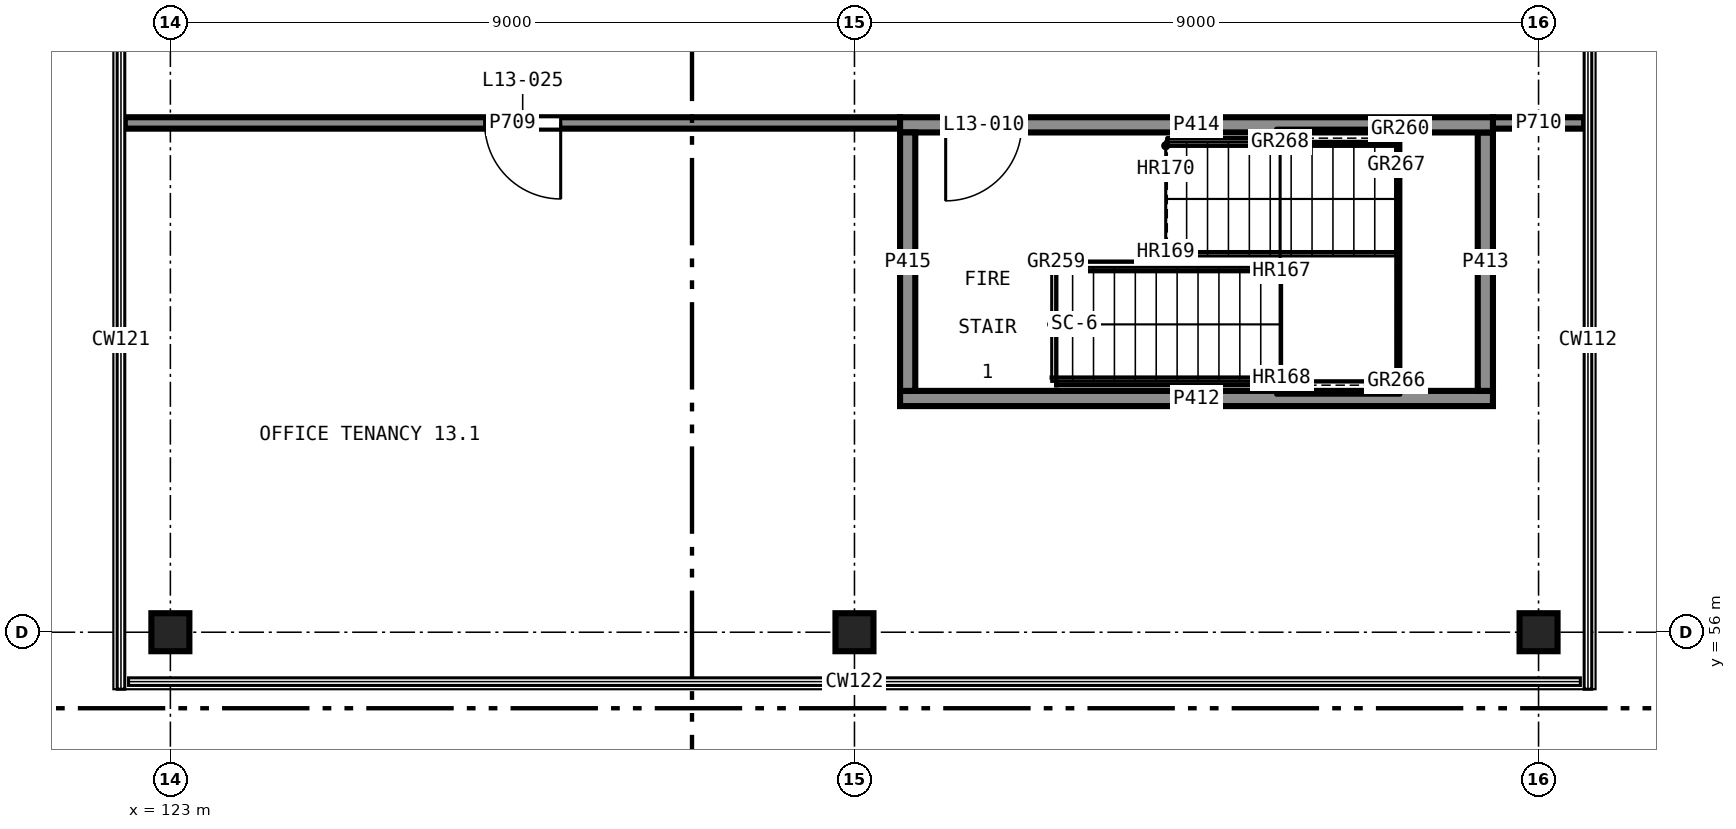
"""IFC4 building model, lengths in metres.
Left out: names, types, materials, properties, quantities, classifications, styles, units other than length and angle.
Written with IfcOpenShell. Run it as: python <this file> out.ifc"""

import sys

from ifc_helpers import new_model, si_unit, direction, frame, frame_2d, origin, origin_2d, place, context, subcontext, project, spatial, rectangle, extrude, element, fill, save


model = new_model("IFC4")
c1 = context("Model", 3, precision=1e-05, world=origin(), true_north=direction((0.0, 1.0)))
c2 = subcontext(c1, "Body", "Model", "MODEL_VIEW")
j1 = project(units=[si_unit("LENGTHUNIT", "METRE"), si_unit("PLANEANGLEUNIT", "RADIAN")], contexts=[c1])
p1 = place(None, origin())
s1 = spatial("IfcSite", under=j1, at=p1, CompositionType="ELEMENT")
p2 = place(p1, origin())
s2 = spatial("IfcBuilding", under=s1, at=p2, CompositionType="ELEMENT")
p3 = place(p2, frame((0.0, 0.0, 53.5)))
s3 = spatial("IfcBuildingStorey", under=s2, at=p3, CompositionType="ELEMENT", Elevation=53.5)
for number, where, z_axis, x_axis in (
    (1, (123.0, 56.0, 0.0), (0.0, 0.0, 1.0), (1.0, 0.0, 0.0)),
    (2, (132.0, 56.0, 0.0), (0.0, 0.0, 1.0), (1.0, 0.0, 0.0)),
    (3, (141.0, 56.0, 0.0), (0.0, 0.0, 1.0), (1.0, 0.0, 0.0)),
):
    element("IfcColumn", number, at=place(p3, frame(where, z_axis=z_axis, x_axis=x_axis)), inside=s3, PredefinedType="COLUMN", context=c2, shape_type="SweptSolid", body=[
        extrude(rectangle(XDim=0.5, YDim=0.5, at=origin_2d()), origin(), (0.0, 0.0, 1.0), 4.0),
    ])
p4 = place(p3, frame((132.6, 59.075, 0.0), z_axis=(0.0, 0.0, 1.0), x_axis=(1.0, 0.0, 0.0)))
e4 = element("IfcWall", 4, at=p4, inside=s3, PredefinedType="SHEAR", context=c2, shape_type="SweptSolid", body=[
    extrude(rectangle(XDim=7.8, YDim=0.2, at=frame_2d((3.9, 0.0))), origin(), (0.0, 0.0, 1.0), 3.75),
])
p5 = place(p3, frame((140.3, 59.175, 0.0), z_axis=(0.0, 0.0, 1.0), x_axis=(0.0, 1.0, 0.0)))
e5 = element("IfcWall", 5, at=p5, inside=s3, PredefinedType="SHEAR", context=c2, shape_type="SweptSolid", body=[
    extrude(rectangle(XDim=3.4, YDim=0.2, at=frame_2d((1.7, 0.0))), origin(), (0.0, 0.0, 1.0), 3.75),
])
p6 = place(p3, frame((140.4, 62.675, 0.0), z_axis=(0.0, 0.0, 1.0), x_axis=(-1.0, 0.0, 0.0)))
e6 = element("IfcWall", 6, at=p6, inside=s3, PredefinedType="SHEAR", context=c2, shape_type="SweptSolid", body=[
    extrude(rectangle(XDim=7.8, YDim=0.2, at=frame_2d((3.9, 0.0))), origin(), (0.0, 0.0, 1.0), 3.75),
])
p7 = place(p6, frame((6.2, 0.0, 0.0)))
e7 = element("IfcOpeningElement", 7, at=p7, cuts=e6, PredefinedType="OPENING", context=c2, shape_type="SweptSolid", body=[
    extrude(rectangle(XDim=1.0, YDim=2.1, at=frame_2d((0.5, 1.05))), frame((0.0, 0.11, 0.0), z_axis=(0.0, -1.0, 0.0), x_axis=(1.0, 0.0, 0.0)), (0.0, 0.0, 1.0), 0.22),
])
p8 = place(p3, frame((132.7, 62.575, 0.0), z_axis=(0.0, 0.0, 1.0), x_axis=(0.0, -1.0, 0.0)))
e8 = element("IfcWall", 8, at=p8, inside=s3, PredefinedType="SHEAR", context=c2, shape_type="SweptSolid", body=[
    extrude(rectangle(XDim=3.4, YDim=0.2, at=frame_2d((1.7, 0.0))), origin(), (0.0, 0.0, 1.0), 3.75),
])
p9 = place(p3, frame((132.6, 62.7, 0.0), z_axis=(0.0, 0.0, 1.0), x_axis=(-1.0, 0.0, 0.0)))
e9 = element("IfcWall", 9, at=p9, inside=s3, PredefinedType="PARTITIONING", context=c2, shape_type="SweptSolid", body=[
    extrude(rectangle(XDim=10.2, YDim=0.15, at=frame_2d((5.1, 0.0))), origin(), (0.0, 0.0, 1.0), 3.75),
])
p10 = place(p9, frame((4.465, 0.0, 0.0)))
e10 = element("IfcOpeningElement", 10, at=p10, cuts=e9, PredefinedType="OPENING", context=c2, shape_type="SweptSolid", body=[
    extrude(rectangle(XDim=1.0, YDim=2.1, at=frame_2d((0.5, 1.05))), frame((0.0, 0.085, 0.0), z_axis=(0.0, -1.0, 0.0), x_axis=(1.0, 0.0, 0.0)), (0.0, 0.0, 1.0), 0.17),
])
p11 = place(p3, frame((141.6, 62.7, 0.0), z_axis=(0.0, 0.0, 1.0), x_axis=(-1.0, 0.0, 0.0)))
e11 = element("IfcWall", 11, at=p11, inside=s3, PredefinedType="PARTITIONING", context=c2, shape_type="SweptSolid", body=[
    extrude(rectangle(XDim=1.2, YDim=0.15, at=frame_2d((0.6, 0.0))), origin(), (0.0, 0.0, 1.0), 3.75),
])
p12 = place(p7, origin())
e12 = element("IfcDoor", 12, at=p12, inside=s3, OperationType="SINGLE_SWING_LEFT", PredefinedType="DOOR", context=c2, shape_type="SweptSolid", body=[
    extrude(rectangle(XDim=1.0, YDim=2.1, at=frame_2d((0.5, 1.05))), frame((0.0, 0.025, 0.0), z_axis=(0.0, -1.0, 0.0), x_axis=(1.0, 0.0, 0.0)), (0.0, 0.0, 1.0), 0.05),
])
fill(e7, e12)
p13 = place(p10, origin())
e13 = element("IfcDoor", 13, at=p13, inside=s3, OperationType="SINGLE_SWING_RIGHT", PredefinedType="DOOR", context=c2, shape_type="SweptSolid", body=[
    extrude(rectangle(XDim=1.0, YDim=2.1, at=frame_2d((0.5, 1.05))), frame((0.0, 0.025, 0.0), z_axis=(0.0, -1.0, 0.0), x_axis=(1.0, 0.0, 0.0)), (0.0, 0.0, 1.0), 0.05),
])
fill(e10, e13)
save(model, sys.argv[1])
